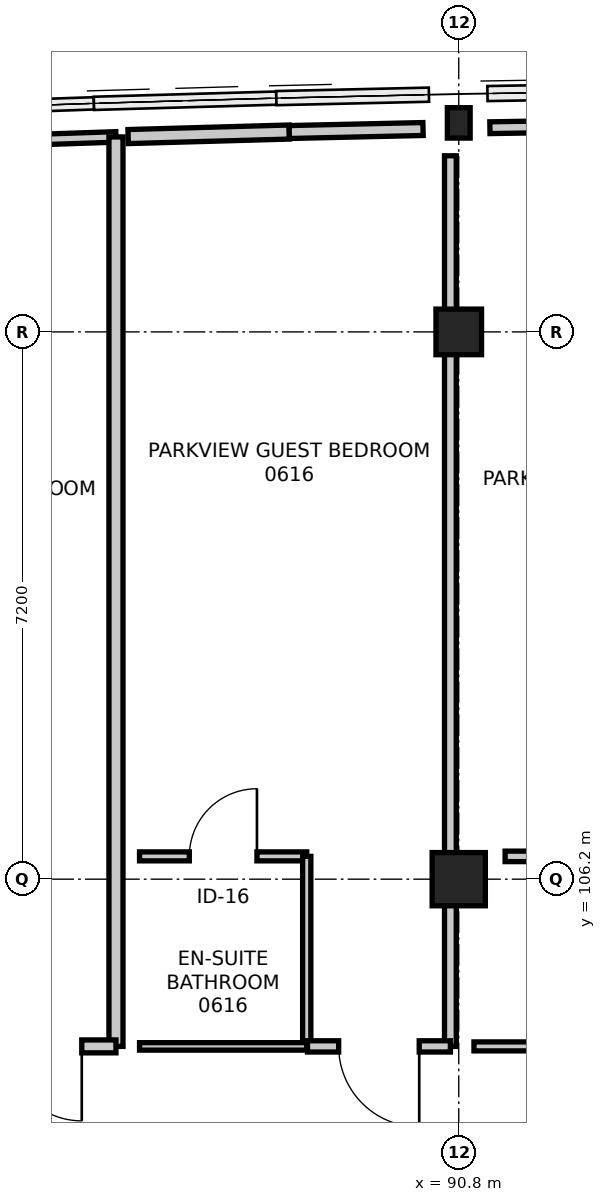
"""IFC4 building model, lengths in metres.
Left out: names, types, materials, properties, quantities, classifications, styles, units other than length and angle.
Written with IfcOpenShell. Run it as: python <this file> out.ifc"""

import sys

from ifc_helpers import new_model, si_unit, direction, frame, frame_2d, origin, origin_2d, place, context, subcontext, project, spatial, rectangle, i_section, extrude, element, fill, save


model = new_model("IFC4")
c1 = context("Model", 3, precision=1e-05, world=origin(), true_north=direction((0.0, 1.0)))
c2 = subcontext(c1, "Body", "Model", "MODEL_VIEW")
j1 = project(units=[si_unit("LENGTHUNIT", "METRE"), si_unit("PLANEANGLEUNIT", "RADIAN")], contexts=[c1])
p1 = place(None, origin())
s1 = spatial("IfcSite", under=j1, at=p1, CompositionType="ELEMENT")
p2 = place(p1, origin())
s2 = spatial("IfcBuilding", under=s1, at=p2, CompositionType="ELEMENT")
p3 = place(p2, frame((0.0, 0.0, 26.4)))
s3 = spatial("IfcBuildingStorey", under=s2, at=p3, CompositionType="ELEMENT", Elevation=26.4)
p4 = place(p3, frame((90.8, 106.2, 0.0), z_axis=(0.0, 0.0, 1.0), x_axis=(1.0, 0.0, 0.0)))
e1 = element("IfcColumn", 1, at=p4, inside=s3, PredefinedType="COLUMN", context=c2, shape_type="SweptSolid", body=[
    extrude(rectangle(XDim=0.7, YDim=0.7, at=origin_2d()), origin(), (0.0, 0.0, 1.0), 3.6),
])
p5 = place(p3, frame((90.8, 113.4, 0.0), z_axis=(0.0, 0.0, 1.0), x_axis=(1.0, 0.0, 0.0)))
e2 = element("IfcColumn", 2, at=p5, inside=s3, PredefinedType="COLUMN", context=c2, shape_type="SweptSolid", body=[
    extrude(rectangle(XDim=0.6, YDim=0.6, at=origin_2d()), origin(), (0.0, 0.0, 1.0), 3.6),
])
p6 = place(p3, frame((90.8, 116.15, 0.0), z_axis=(0.0, 0.0, 1.0), x_axis=(1.0, 0.0, 0.0)))
e3 = element("IfcColumn", 3, at=p6, inside=s3, PredefinedType="COLUMN", context=c2, shape_type="SweptSolid", body=[
    extrude(i_section(OverallWidth=0.3, OverallDepth=0.4, WebThickness=0.013, FlangeThickness=0.024, FilletRadius=0.027, at=origin_2d()), origin(), (0.0, 0.0, 1.0), 3.6),
])
p7 = place(p3, frame((84.17, 115.894, 0.0), z_axis=(0.0, 0.0, 1.0), x_axis=(0.999431284575, 0.033721023305, 0.0)))
e4 = element("IfcWall", 4, at=p7, inside=s3, PredefinedType="PARTITIONING", context=c2, shape_type="SweptSolid", body=[
    extrude(rectangle(XDim=2.121, YDim=0.138, at=frame_2d((1.061, 0.0))), origin(), (0.0, 0.0, 1.0), 2.926),
])
p8 = place(p3, frame((86.29, 115.965, 0.0), z_axis=(0.0, 0.0, 1.0), x_axis=(0.0, -1.0, 0.0)))
e5 = element("IfcWall", 5, at=p8, inside=s3, PredefinedType="PARTITIONING", context=c2, shape_type="SweptSolid", body=[
    extrude(rectangle(XDim=11.965, YDim=0.185, at=frame_2d((5.983, 0.0))), origin(), (0.0, 0.0, 1.0), 2.735),
])
p9 = place(p3, frame((86.29, 104.0, 0.0), z_axis=(0.0, 0.0, 1.0), x_axis=(-1.0, 0.0, 0.0)))
e6 = element("IfcWall", 6, at=p9, inside=s3, PredefinedType="PARTITIONING", context=c2, shape_type="SweptSolid", body=[
    extrude(rectangle(XDim=1.88, YDim=0.17, at=frame_2d((0.94, 0.0))), origin(), (0.0, 0.0, 1.0), 3.35),
])
p10 = place(p9, frame((0.45, 0.0, 0.0)))
e7 = element("IfcOpeningElement", 7, at=p10, cuts=e6, PredefinedType="OPENING", context=c2, shape_type="SweptSolid", body=[
    extrude(rectangle(XDim=0.98, YDim=2.15, at=frame_2d((0.49, 1.075))), frame((0.0, 0.095, 0.0), z_axis=(0.0, -1.0, 0.0), x_axis=(1.0, 0.0, 0.0)), (0.0, 0.0, 1.0), 0.19),
])
p11 = place(p3, frame((86.6, 106.5, 0.0), z_axis=(0.0, 0.0, 1.0), x_axis=(1.0, 0.0, 0.0)))
e8 = element("IfcWall", 8, at=p11, inside=s3, PredefinedType="PARTITIONING", context=c2, shape_type="SweptSolid", body=[
    extrude(rectangle(XDim=2.2, YDim=0.118, at=frame_2d((1.1, 0.0))), origin(), (0.0, 0.0, 1.0), 3.35),
])
p12 = place(p11, frame((0.655, 0.0, 0.0)))
e9 = element("IfcOpeningElement", 9, at=p12, cuts=e8, PredefinedType="OPENING", context=c2, shape_type="SweptSolid", body=[
    extrude(rectangle(XDim=0.89, YDim=2.09, at=frame_2d((0.445, 1.045))), frame((0.0, 0.069, 0.0), z_axis=(0.0, -1.0, 0.0), x_axis=(1.0, 0.0, 0.0)), (0.0, 0.0, 1.0), 0.138),
])
p13 = place(p3, frame((88.8, 106.5, 0.0), z_axis=(0.0, 0.0, 1.0), x_axis=(0.0, -1.0, 0.0)))
e10 = element("IfcWall", 10, at=p13, inside=s3, PredefinedType="PARTITIONING", context=c2, shape_type="SweptSolid", body=[
    extrude(rectangle(XDim=2.5, YDim=0.108, at=frame_2d((1.25, 0.0))), origin(), (0.0, 0.0, 1.0), 2.735),
])
p14 = place(p3, frame((88.8, 104.0, 0.0), z_axis=(0.0, 0.0, 1.0), x_axis=(-1.0, 0.0, 0.0)))
e11 = element("IfcWall", 11, at=p14, inside=s3, PredefinedType="PARTITIONING", context=c2, shape_type="SweptSolid", body=[
    extrude(rectangle(XDim=2.2, YDim=0.098, at=frame_2d((1.1, 0.0))), origin(), (0.0, 0.0, 1.0), 3.35),
])
p15 = place(p3, frame((86.45, 115.97, 0.0), z_axis=(0.0, 0.0, 1.0), x_axis=(0.999602256239, 0.028201583692, 0.0)))
e12 = element("IfcWall", 12, at=p15, inside=s3, PredefinedType="PARTITIONING", context=c2, shape_type="SweptSolid", body=[
    extrude(rectangle(XDim=2.121, YDim=0.185, at=frame_2d((1.061, 0.0))), origin(), (0.0, 0.0, 1.0), 2.926),
])
p16 = place(p3, frame((88.57, 116.03, 0.0), z_axis=(0.0, 0.0, 1.0), x_axis=(0.999747602217, 0.022466238252, 0.0)))
e13 = element("IfcWall", 13, at=p16, inside=s3, PredefinedType="PARTITIONING", context=c2, shape_type="SweptSolid", body=[
    extrude(rectangle(XDim=1.76, YDim=0.17, at=frame_2d((0.88, 0.0))), origin(), (0.0, 0.0, 1.0), 2.926),
])
p17 = place(p3, frame((90.69, 115.717, 0.0), z_axis=(0.0, 0.0, 1.0), x_axis=(0.0, -1.0, 0.0)))
e14 = element("IfcWall", 14, at=p17, inside=s3, PredefinedType="PARTITIONING", context=c2, shape_type="SweptSolid", body=[
    extrude(rectangle(XDim=11.717, YDim=0.155, at=frame_2d((5.859, 0.0))), origin(), (0.0, 0.0, 1.0), 2.685),
])
p18 = place(p3, frame((90.69, 104.0, 0.0), z_axis=(0.0, 0.0, 1.0), x_axis=(-1.0, 0.0, 0.0)))
e15 = element("IfcWall", 15, at=p18, inside=s3, PredefinedType="PARTITIONING", context=c2, shape_type="SweptSolid", body=[
    extrude(rectangle(XDim=1.88, YDim=0.148, at=frame_2d((0.94, 0.0))), origin(), (0.0, 0.0, 1.0), 2.685),
])
p19 = place(p18, frame((0.41, 0.0, 0.0)))
e16 = element("IfcOpeningElement", 16, at=p19, cuts=e15, PredefinedType="OPENING", context=c2, shape_type="SweptSolid", body=[
    extrude(rectangle(XDim=1.06, YDim=2.2, at=frame_2d((0.53, 1.1))), frame((0.0, 0.084, 0.0), z_axis=(0.0, -1.0, 0.0), x_axis=(1.0, 0.0, 0.0)), (0.0, 0.0, 1.0), 0.168),
])
p20 = place(p3, frame((91.41, 106.5, 0.0), z_axis=(0.0, 0.0, 1.0), x_axis=(1.0, 0.0, 0.0)))
e17 = element("IfcWall", 17, at=p20, inside=s3, PredefinedType="PARTITIONING", context=c2, shape_type="SweptSolid", body=[
    extrude(rectangle(XDim=1.79, YDim=0.138, at=frame_2d((0.895, 0.0))), origin(), (0.0, 0.0, 1.0), 3.35),
])
p21 = place(p3, frame((93.2, 104.0, 0.0), z_axis=(0.0, 0.0, 1.0), x_axis=(-1.0, 0.0, 0.0)))
e18 = element("IfcWall", 18, at=p21, inside=s3, PredefinedType="PARTITIONING", context=c2, shape_type="SweptSolid", body=[
    extrude(rectangle(XDim=2.2, YDim=0.118, at=frame_2d((1.1, 0.0))), origin(), (0.0, 0.0, 1.0), 2.685),
])
p22 = place(p3, frame((91.21, 116.086, 0.0), z_axis=(0.0, 0.0, 1.0), x_axis=(0.999868324223, 0.016227575799, 0.0)))
e19 = element("IfcWall", 19, at=p22, inside=s3, PredefinedType="PARTITIONING", context=c2, shape_type="SweptSolid", body=[
    extrude(rectangle(XDim=1.76, YDim=0.155, at=frame_2d((0.88, 0.0))), origin(), (0.0, 0.0, 1.0), 2.926),
])
p23 = place(p10, origin())
e20 = element("IfcDoor", 20, at=p23, inside=s3, OperationType="SINGLE_SWING_LEFT", PredefinedType="DOOR", context=c2, shape_type="SweptSolid", body=[
    extrude(rectangle(XDim=0.98, YDim=2.15, at=frame_2d((0.49, 1.075))), frame((0.0, 0.025, 0.0), z_axis=(0.0, -1.0, 0.0), x_axis=(1.0, 0.0, 0.0)), (0.0, 0.0, 1.0), 0.05),
])
fill(e7, e20)
p24 = place(p12, origin())
e21 = element("IfcDoor", 21, at=p24, inside=s3, OperationType="SINGLE_SWING_RIGHT", PredefinedType="DOOR", context=c2, shape_type="SweptSolid", body=[
    extrude(rectangle(XDim=0.89, YDim=2.09, at=frame_2d((0.445, 1.045))), frame((0.0, 0.025, 0.0), z_axis=(0.0, -1.0, 0.0), x_axis=(1.0, 0.0, 0.0)), (0.0, 0.0, 1.0), 0.05),
])
fill(e9, e21)
p25 = place(p19, origin())
e22 = element("IfcDoor", 22, at=p25, inside=s3, OperationType="SINGLE_SWING_LEFT", PredefinedType="DOOR", context=c2, shape_type="SweptSolid", body=[
    extrude(rectangle(XDim=1.06, YDim=2.2, at=frame_2d((0.53, 1.1))), frame((0.0, 0.025, 0.0), z_axis=(0.0, -1.0, 0.0), x_axis=(1.0, 0.0, 0.0)), (0.0, 0.0, 1.0), 0.05),
])
fill(e16, e22)
save(model, sys.argv[1])
